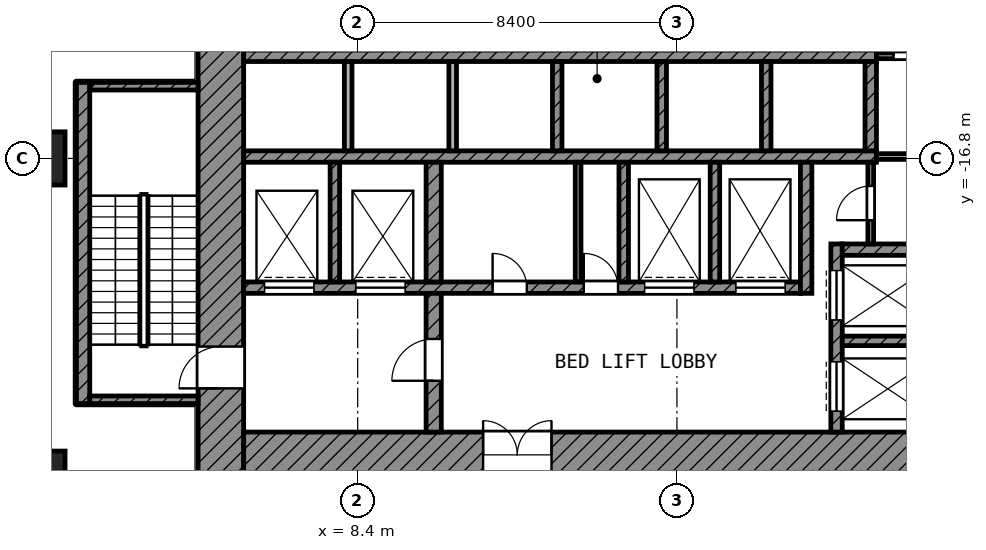
"""IFC4 building model, lengths in metres.
Left out: names, types, materials, properties, quantities, classifications, styles, units other than length and angle.
Written with IfcOpenShell. Run it as: python <this file> out.ifc"""

import sys

from ifc_helpers import new_model, si_unit, direction, frame, frame_2d, origin, origin_2d, place, context, subcontext, project, spatial, rectangle, extrude, element, fill, save


model = new_model("IFC4")
c1 = context("Model", 3, precision=1e-05, world=origin(), true_north=direction((0.0, 1.0)))
c2 = subcontext(c1, "Body", "Model", "MODEL_VIEW")
j1 = project(units=[si_unit("LENGTHUNIT", "METRE"), si_unit("PLANEANGLEUNIT", "RADIAN")], contexts=[c1])
p1 = place(None, origin())
s1 = spatial("IfcSite", under=j1, at=p1, CompositionType="ELEMENT")
p2 = place(p1, origin())
s2 = spatial("IfcBuilding", under=s1, at=p2, CompositionType="ELEMENT")
p3 = place(p2, frame((0.0, 0.0, 29.0)))
s3 = spatial("IfcBuildingStorey", under=s2, at=p3, CompositionType="ELEMENT", Elevation=29.0)
for number, where, z_axis, x_axis in (
    (1, (0.0, -16.8, 0.0), (0.0, 0.0, 1.0), (1.0, 0.0, 0.0)),
    (2, (0.0, -25.2, 0.0), (0.0, 0.0, 1.0), (1.0, 0.0, 0.0)),
):
    element("IfcColumn", number, at=place(p3, frame(where, z_axis=z_axis, x_axis=x_axis)), inside=s3, PredefinedType="COLUMN", context=c2, shape_type="SweptSolid", body=[
        extrude(rectangle(XDim=1.4, YDim=1.4, at=origin_2d()), origin(), (0.0, 0.0, 1.0), 5.2),
    ])
p4 = place(p3, frame((4.8, -25.2, 0.0), z_axis=(0.0, 0.0, 1.0), x_axis=(0.0, 1.0, 0.0)))
e3 = element("IfcWall", 3, at=p4, inside=s3, PredefinedType="SHEAR", context=c2, shape_type="SweptSolid", body=[
    extrude(rectangle(XDim=19.8, YDim=1.2, at=frame_2d((9.9, 0.0))), origin(), (0.0, 0.0, 1.0), 4.7),
])
p5 = place(p4, frame((11.65, 0.0, 0.0)))
e4 = element("IfcOpeningElement", 4, at=p5, cuts=e3, PredefinedType="OPENING", context=c2, shape_type="SweptSolid", body=[
    extrude(rectangle(XDim=1.1, YDim=2.1, at=frame_2d((0.55, 1.05))), frame((0.0, 0.61, 0.0), z_axis=(0.0, -1.0, 0.0), x_axis=(1.0, 0.0, 0.0)), (0.0, 0.0, 1.0), 1.22),
])
p6 = place(p4, frame((2.35, 0.0, 0.0)))
e5 = element("IfcOpeningElement", 5, at=p6, cuts=e3, PredefinedType="OPENING", context=c2, shape_type="SweptSolid", body=[
    extrude(rectangle(XDim=1.1, YDim=2.1, at=frame_2d((0.55, 1.05))), frame((0.0, 0.61, 0.0), z_axis=(0.0, -1.0, 0.0), x_axis=(1.0, 0.0, 0.0)), (0.0, 0.0, 1.0), 1.22),
])
p7 = place(p3, frame((5.4, -24.6, 0.0), z_axis=(0.0, 0.0, 1.0), x_axis=(1.0, 0.0, 0.0)))
e6 = element("IfcWall", 6, at=p7, inside=s3, PredefinedType="SHEAR", context=c2, shape_type="SweptSolid", body=[
    extrude(rectangle(XDim=18.6, YDim=1.2, at=frame_2d((9.3, 0.0))), origin(), (0.0, 0.0, 1.0), 4.7),
])
p8 = place(p7, frame((6.3, 0.0, 0.0)))
e7 = element("IfcOpeningElement", 7, at=p8, cuts=e6, PredefinedType="OPENING", context=c2, shape_type="SweptSolid", body=[
    extrude(rectangle(XDim=1.8, YDim=2.1, at=frame_2d((0.9, 1.05))), frame((0.0, 0.61, 0.0), z_axis=(0.0, -1.0, 0.0), x_axis=(1.0, 0.0, 0.0)), (0.0, 0.0, 1.0), 1.22),
])
for number, where, z_axis, x_axis in (
    (8, (5.4, -14.1, 0.0), (0.0, 0.0, 1.0), (1.0, 0.0, 0.0)),
    (9, (5.4, -16.75, 0.0), (0.0, 0.0, 1.0), (1.0, 0.0, 0.0)),
):
    element("IfcWall", number, at=place(p3, frame(where, z_axis=z_axis, x_axis=x_axis)), inside=s3, PredefinedType="SHEAR", context=c2, shape_type="SweptSolid", body=[
        extrude(rectangle(XDim=16.65, YDim=0.3, at=frame_2d((8.325, 0.0))), origin(), (0.0, 0.0, 1.0), 4.7),
    ])
p9 = place(p3, frame((5.4, -20.2, 0.0), z_axis=(0.0, 0.0, 1.0), x_axis=(1.0, 0.0, 0.0)))
e10 = element("IfcWall", 10, at=p9, inside=s3, PredefinedType="SHEAR", context=c2, shape_type="SweptSolid", body=[
    extrude(rectangle(XDim=14.65, YDim=0.3, at=frame_2d((7.325, 0.0))), origin(), (0.0, 0.0, 1.0), 4.7),
])
p10 = place(p9, frame((10.55, 0.0, 0.0)))
e11 = element("IfcOpeningElement", 11, at=p10, cuts=e10, PredefinedType="OPENING", context=c2, shape_type="SweptSolid", body=[
    extrude(rectangle(XDim=1.3, YDim=2.1, at=frame_2d((0.65, 1.05))), frame((0.0, 0.16, 0.0), z_axis=(0.0, -1.0, 0.0), x_axis=(1.0, 0.0, 0.0)), (0.0, 0.0, 1.0), 0.32),
])
p11 = place(p9, frame((12.95, 0.0, 0.0)))
e12 = element("IfcOpeningElement", 12, at=p11, cuts=e10, PredefinedType="OPENING", context=c2, shape_type="SweptSolid", body=[
    extrude(rectangle(XDim=1.3, YDim=2.1, at=frame_2d((0.65, 1.05))), frame((0.0, 0.16, 0.0), z_axis=(0.0, -1.0, 0.0), x_axis=(1.0, 0.0, 0.0)), (0.0, 0.0, 1.0), 0.32),
])
p12 = place(p9, frame((0.55, 0.0, 0.0)))
e13 = element("IfcOpeningElement", 13, at=p12, cuts=e10, PredefinedType="OPENING", context=c2, shape_type="SweptSolid", body=[
    extrude(rectangle(XDim=1.3, YDim=2.1, at=frame_2d((0.65, 1.05))), frame((0.0, 0.16, 0.0), z_axis=(0.0, -1.0, 0.0), x_axis=(1.0, 0.0, 0.0)), (0.0, 0.0, 1.0), 0.32),
])
p13 = place(p9, frame((2.95, 0.0, 0.0)))
e14 = element("IfcOpeningElement", 14, at=p13, cuts=e10, PredefinedType="OPENING", context=c2, shape_type="SweptSolid", body=[
    extrude(rectangle(XDim=1.3, YDim=2.1, at=frame_2d((0.65, 1.05))), frame((0.0, 0.16, 0.0), z_axis=(0.0, -1.0, 0.0), x_axis=(1.0, 0.0, 0.0)), (0.0, 0.0, 1.0), 0.32),
])
p14 = place(p9, frame((6.55, 0.0, 0.0)))
e15 = element("IfcOpeningElement", 15, at=p14, cuts=e10, PredefinedType="OPENING", context=c2, shape_type="SweptSolid", body=[
    extrude(rectangle(XDim=0.9, YDim=2.1, at=frame_2d((0.45, 1.05))), frame((0.0, 0.16, 0.0), z_axis=(0.0, -1.0, 0.0), x_axis=(1.0, 0.0, 0.0)), (0.0, 0.0, 1.0), 0.32),
])
p15 = place(p9, frame((8.95, 0.0, 0.0)))
e16 = element("IfcOpeningElement", 16, at=p15, cuts=e10, PredefinedType="OPENING", context=c2, shape_type="SweptSolid", body=[
    extrude(rectangle(XDim=0.9, YDim=2.1, at=frame_2d((0.45, 1.05))), frame((0.0, 0.16, 0.0), z_axis=(0.0, -1.0, 0.0), x_axis=(1.0, 0.0, 0.0)), (0.0, 0.0, 1.0), 0.32),
])
p16 = place(p3, frame((10.4, -24.0, 0.0), z_axis=(0.0, 0.0, 1.0), x_axis=(0.0, 1.0, 0.0)))
e17 = element("IfcWall", 17, at=p16, inside=s3, PredefinedType="SHEAR", context=c2, shape_type="SweptSolid", body=[
    extrude(rectangle(XDim=3.65, YDim=0.4, at=frame_2d((1.825, 0.0))), origin(), (0.0, 0.0, 1.0), 4.7),
])
p17 = place(p16, frame((1.35, 0.0, 0.0)))
e18 = element("IfcOpeningElement", 18, at=p17, cuts=e17, PredefinedType="OPENING", context=c2, shape_type="SweptSolid", body=[
    extrude(rectangle(XDim=1.1, YDim=2.1, at=frame_2d((0.55, 1.05))), frame((0.0, 0.21, 0.0), z_axis=(0.0, -1.0, 0.0), x_axis=(1.0, 0.0, 0.0)), (0.0, 0.0, 1.0), 0.42),
])
p18 = place(p3, frame((10.4, -20.05, 0.0), z_axis=(0.0, 0.0, 1.0), x_axis=(0.0, 1.0, 0.0)))
e19 = element("IfcWall", 19, at=p18, inside=s3, PredefinedType="SHEAR", context=c2, shape_type="SweptSolid", body=[
    extrude(rectangle(XDim=3.15, YDim=0.4, at=frame_2d((1.575, 0.0))), origin(), (0.0, 0.0, 1.0), 4.7),
])
p19 = place(p3, frame((20.2, -20.35, 0.0), z_axis=(0.0, 0.0, 1.0), x_axis=(0.0, 1.0, 0.0)))
e20 = element("IfcWall", 20, at=p19, inside=s3, PredefinedType="SHEAR", context=c2, shape_type="SweptSolid", body=[
    extrude(rectangle(XDim=3.45, YDim=0.3, at=frame_2d((1.725, 0.0))), origin(), (0.0, 0.0, 1.0), 4.7),
])
p20 = place(p3, frame((21.9, -16.6, 0.0), z_axis=(0.0, 0.0, 1.0), x_axis=(0.0, 1.0, 0.0)))
e21 = element("IfcWall", 21, at=p20, inside=s3, PredefinedType="SHEAR", context=c2, shape_type="SweptSolid", body=[
    extrude(rectangle(XDim=2.35, YDim=0.3, at=frame_2d((1.175, 0.0))), origin(), (0.0, 0.0, 1.0), 4.7),
])
p21 = place(p3, frame((21.15, -19.2, 0.0), z_axis=(0.0, 0.0, 1.0), x_axis=(1.0, 0.0, 0.0)))
e22 = element("IfcWall", 22, at=p21, inside=s3, PredefinedType="SHEAR", context=c2, shape_type="SweptSolid", body=[
    extrude(rectangle(XDim=2.85, YDim=0.3, at=frame_2d((1.425, 0.0))), origin(), (0.0, 0.0, 1.0), 4.7),
])
p22 = place(p3, frame((21.0, -24.0, 0.0), z_axis=(0.0, 0.0, 1.0), x_axis=(0.0, 1.0, 0.0)))
e23 = element("IfcWall", 23, at=p22, inside=s3, PredefinedType="SHEAR", context=c2, shape_type="SweptSolid", body=[
    extrude(rectangle(XDim=4.95, YDim=0.3, at=frame_2d((2.475, 0.0))), origin(), (0.0, 0.0, 1.0), 4.7),
])
p23 = place(p22, frame((2.95, 0.0, 0.0)))
e24 = element("IfcOpeningElement", 24, at=p23, cuts=e23, PredefinedType="OPENING", context=c2, shape_type="SweptSolid", body=[
    extrude(rectangle(XDim=1.3, YDim=2.1, at=frame_2d((0.65, 1.05))), frame((0.0, 0.16, 0.0), z_axis=(0.0, -1.0, 0.0), x_axis=(1.0, 0.0, 0.0)), (0.0, 0.0, 1.0), 0.32),
])
p24 = place(p22, frame((0.55, 0.0, 0.0)))
e25 = element("IfcOpeningElement", 25, at=p24, cuts=e23, PredefinedType="OPENING", context=c2, shape_type="SweptSolid", body=[
    extrude(rectangle(XDim=1.3, YDim=2.1, at=frame_2d((0.65, 1.05))), frame((0.0, 0.16, 0.0), z_axis=(0.0, -1.0, 0.0), x_axis=(1.0, 0.0, 0.0)), (0.0, 0.0, 1.0), 0.32),
])
p25 = place(p3, frame((21.15, -21.6, 0.0), z_axis=(0.0, 0.0, 1.0), x_axis=(1.0, 0.0, 0.0)))
e26 = element("IfcWall", 26, at=p25, inside=s3, PredefinedType="SHEAR", context=c2, shape_type="SweptSolid", body=[
    extrude(rectangle(XDim=2.85, YDim=0.25, at=frame_2d((1.425, 0.0))), origin(), (0.0, 0.0, 1.0), 4.7),
])
for number, where, z_axis, x_axis in (
    (27, (7.8, -20.05, 0.0), (0.0, 0.0, 1.0), (0.0, 1.0, 0.0)),
    (28, (15.4, -20.05, 0.0), (0.0, 0.0, 1.0), (0.0, 1.0, 0.0)),
    (29, (17.8, -20.05, 0.0), (0.0, 0.0, 1.0), (0.0, 1.0, 0.0)),
):
    element("IfcWall", number, at=place(p3, frame(where, z_axis=z_axis, x_axis=x_axis)), inside=s3, PredefinedType="SHEAR", context=c2, shape_type="SweptSolid", body=[
        extrude(rectangle(XDim=3.15, YDim=0.25, at=frame_2d((1.575, 0.0))), origin(), (0.0, 0.0, 1.0), 4.7),
    ])
for number, where, z_axis, x_axis in (
    (30, (8.15, -16.6, 0.0), (0.0, 0.0, 1.0), (0.0, 1.0, 0.0)),
    (31, (10.9, -16.6, 0.0), (0.0, 0.0, 1.0), (0.0, 1.0, 0.0)),
):
    element("IfcWall", number, at=place(p3, frame(where, z_axis=z_axis, x_axis=x_axis)), inside=s3, PredefinedType="PARTITIONING", context=c2, shape_type="SweptSolid", body=[
        extrude(rectangle(XDim=2.35, YDim=0.2, at=frame_2d((1.175, 0.0))), origin(), (0.0, 0.0, 1.0), 4.7),
    ])
for number, where, z_axis, x_axis in (
    (32, (13.65, -16.6, 0.0), (0.0, 0.0, 1.0), (0.0, 1.0, 0.0)),
    (33, (16.4, -16.6, 0.0), (0.0, 0.0, 1.0), (0.0, 1.0, 0.0)),
    (34, (19.15, -16.6, 0.0), (0.0, 0.0, 1.0), (0.0, 1.0, 0.0)),
):
    element("IfcWall", number, at=place(p3, frame(where, z_axis=z_axis, x_axis=x_axis)), inside=s3, PredefinedType="SHEAR", context=c2, shape_type="SweptSolid", body=[
        extrude(rectangle(XDim=2.35, YDim=0.25, at=frame_2d((1.175, 0.0))), origin(), (0.0, 0.0, 1.0), 4.7),
    ])
p26 = place(p3, frame((21.9, -19.05, 0.0), z_axis=(0.0, 0.0, 1.0), x_axis=(0.0, 1.0, 0.0)))
e35 = element("IfcWall", 35, at=p26, inside=s3, PredefinedType="PARTITIONING", context=c2, shape_type="SweptSolid", body=[
    extrude(rectangle(XDim=2.15, YDim=0.15, at=frame_2d((1.075, 0.0))), origin(), (0.0, 0.0, 1.0), 4.7),
])
p27 = place(p26, frame((0.625, 0.0, 0.0)))
e36 = element("IfcOpeningElement", 36, at=p27, cuts=e35, PredefinedType="OPENING", context=c2, shape_type="SweptSolid", body=[
    extrude(rectangle(XDim=0.9, YDim=2.1, at=frame_2d((0.45, 1.05))), frame((0.0, 0.085, 0.0), z_axis=(0.0, -1.0, 0.0), x_axis=(1.0, 0.0, 0.0)), (0.0, 0.0, 1.0), 0.17),
])
p28 = place(p3, frame((22.05, -16.75, 0.0), z_axis=(0.0, 0.0, 1.0), x_axis=(1.0, 0.0, 0.0)))
e37 = element("IfcWall", 37, at=p28, inside=s3, PredefinedType="PARTITIONING", context=c2, shape_type="SweptSolid", body=[
    extrude(rectangle(XDim=1.95, YDim=0.15, at=frame_2d((0.975, 0.0))), origin(), (0.0, 0.0, 1.0), 4.7),
])
p29 = place(p3, frame((22.05, -14.1, 0.0), z_axis=(0.0, 0.0, 1.0), x_axis=(1.0, 0.0, 0.0)))
e38 = element("IfcWall", 38, at=p29, inside=s3, PredefinedType="PARTITIONING", context=c2, shape_type="SweptSolid", body=[
    extrude(rectangle(XDim=1.95, YDim=0.15, at=frame_2d((0.975, 0.0))), origin(), (0.0, 0.0, 1.0), 4.7),
])
p30 = place(p29, frame((0.45, 0.0, 0.0)))
e39 = element("IfcOpeningElement", 39, at=p30, cuts=e38, PredefinedType="OPENING", context=c2, shape_type="SweptSolid", body=[
    extrude(rectangle(XDim=0.9, YDim=2.1, at=frame_2d((0.45, 1.05))), frame((0.0, 0.085, 0.0), z_axis=(0.0, -1.0, 0.0), x_axis=(1.0, 0.0, 0.0)), (0.0, 0.0, 1.0), 0.17),
])
p31 = place(p3, frame((14.2, -20.05, 0.0), z_axis=(0.0, 0.0, 1.0), x_axis=(0.0, 1.0, 0.0)))
e40 = element("IfcWall", 40, at=p31, inside=s3, PredefinedType="PARTITIONING", context=c2, shape_type="SweptSolid", body=[
    extrude(rectangle(XDim=3.15, YDim=0.15, at=frame_2d((1.575, 0.0))), origin(), (0.0, 0.0, 1.0), 4.7),
])
p32 = place(p3, frame((1.175, -23.25, 0.0), z_axis=(0.0, 0.0, 1.0), x_axis=(0.0, 1.0, 0.0)))
e41 = element("IfcWall", 41, at=p32, inside=s3, PredefinedType="SHEAR", context=c2, shape_type="SweptSolid", body=[
    extrude(rectangle(XDim=8.45, YDim=0.35, at=frame_2d((4.225, 0.0))), origin(), (0.0, 0.0, 1.0), 4.7),
])
for number, where, z_axis, x_axis in (
    (42, (1.35, -14.9, 0.0), (0.0, 0.0, 1.0), (1.0, 0.0, 0.0)),
    (43, (1.35, -23.15, 0.0), (0.0, 0.0, 1.0), (1.0, 0.0, 0.0)),
):
    element("IfcWall", number, at=place(p3, frame(where, z_axis=z_axis, x_axis=x_axis)), inside=s3, PredefinedType="SHEAR", context=c2, shape_type="SweptSolid", body=[
        extrude(rectangle(XDim=2.85, YDim=0.2, at=frame_2d((1.425, 0.0))), origin(), (0.0, 0.0, 1.0), 4.7),
    ])
p33 = place(p23, origin())
e44 = element("IfcDoor", 44, at=p33, inside=s3, OperationType="DOUBLE_DOOR_SLIDING", PredefinedType="DOOR", context=c2, shape_type="SweptSolid", body=[
    extrude(rectangle(XDim=1.3, YDim=2.1, at=frame_2d((0.65, 1.05))), frame((0.0, 0.025, 0.0), z_axis=(0.0, -1.0, 0.0), x_axis=(1.0, 0.0, 0.0)), (0.0, 0.0, 1.0), 0.05),
])
fill(e24, e44)
p34 = place(p24, origin())
e45 = element("IfcDoor", 45, at=p34, inside=s3, OperationType="DOUBLE_DOOR_SLIDING", PredefinedType="DOOR", context=c2, shape_type="SweptSolid", body=[
    extrude(rectangle(XDim=1.3, YDim=2.1, at=frame_2d((0.65, 1.05))), frame((0.0, 0.025, 0.0), z_axis=(0.0, -1.0, 0.0), x_axis=(1.0, 0.0, 0.0)), (0.0, 0.0, 1.0), 0.05),
])
fill(e25, e45)
p35 = place(p10, origin())
e46 = element("IfcDoor", 46, at=p35, inside=s3, OperationType="DOUBLE_DOOR_SLIDING", PredefinedType="DOOR", context=c2, shape_type="SweptSolid", body=[
    extrude(rectangle(XDim=1.3, YDim=2.1, at=frame_2d((0.65, 1.05))), frame((0.0, 0.025, 0.0), z_axis=(0.0, -1.0, 0.0), x_axis=(1.0, 0.0, 0.0)), (0.0, 0.0, 1.0), 0.05),
])
fill(e11, e46)
p36 = place(p11, origin())
e47 = element("IfcDoor", 47, at=p36, inside=s3, OperationType="DOUBLE_DOOR_SLIDING", PredefinedType="DOOR", context=c2, shape_type="SweptSolid", body=[
    extrude(rectangle(XDim=1.3, YDim=2.1, at=frame_2d((0.65, 1.05))), frame((0.0, 0.025, 0.0), z_axis=(0.0, -1.0, 0.0), x_axis=(1.0, 0.0, 0.0)), (0.0, 0.0, 1.0), 0.05),
])
fill(e12, e47)
p37 = place(p12, origin())
e48 = element("IfcDoor", 48, at=p37, inside=s3, OperationType="DOUBLE_DOOR_SLIDING", PredefinedType="DOOR", context=c2, shape_type="SweptSolid", body=[
    extrude(rectangle(XDim=1.3, YDim=2.1, at=frame_2d((0.65, 1.05))), frame((0.0, 0.025, 0.0), z_axis=(0.0, -1.0, 0.0), x_axis=(1.0, 0.0, 0.0)), (0.0, 0.0, 1.0), 0.05),
])
fill(e13, e48)
p38 = place(p13, origin())
e49 = element("IfcDoor", 49, at=p38, inside=s3, OperationType="DOUBLE_DOOR_SLIDING", PredefinedType="DOOR", context=c2, shape_type="SweptSolid", body=[
    extrude(rectangle(XDim=1.3, YDim=2.1, at=frame_2d((0.65, 1.05))), frame((0.0, 0.025, 0.0), z_axis=(0.0, -1.0, 0.0), x_axis=(1.0, 0.0, 0.0)), (0.0, 0.0, 1.0), 0.05),
])
fill(e14, e49)
p39 = place(p6, origin())
e50 = element("IfcDoor", 50, at=p39, inside=s3, OperationType="SINGLE_SWING_LEFT", PredefinedType="DOOR", context=c2, shape_type="SweptSolid", body=[
    extrude(rectangle(XDim=1.1, YDim=2.1, at=frame_2d((0.55, 1.05))), frame((0.0, 0.025, 0.0), z_axis=(0.0, -1.0, 0.0), x_axis=(1.0, 0.0, 0.0)), (0.0, 0.0, 1.0), 0.05),
])
fill(e5, e50)
p40 = place(p17, origin())
e51 = element("IfcDoor", 51, at=p40, inside=s3, OperationType="SINGLE_SWING_LEFT", PredefinedType="DOOR", context=c2, shape_type="SweptSolid", body=[
    extrude(rectangle(XDim=1.1, YDim=2.1, at=frame_2d((0.55, 1.05))), frame((0.0, 0.025, 0.0), z_axis=(0.0, -1.0, 0.0), x_axis=(1.0, 0.0, 0.0)), (0.0, 0.0, 1.0), 0.05),
])
fill(e18, e51)
p41 = place(p8, origin())
e52 = element("IfcDoor", 52, at=p41, inside=s3, OperationType="DOUBLE_DOOR_SINGLE_SWING", PredefinedType="DOOR", context=c2, shape_type="SweptSolid", body=[
    extrude(rectangle(XDim=1.8, YDim=2.1, at=frame_2d((0.9, 1.05))), frame((0.0, 0.025, 0.0), z_axis=(0.0, -1.0, 0.0), x_axis=(1.0, 0.0, 0.0)), (0.0, 0.0, 1.0), 0.05),
])
fill(e7, e52)
p42 = place(p30, origin())
e53 = element("IfcDoor", 53, at=p42, inside=s3, OperationType="SINGLE_SWING_LEFT", PredefinedType="DOOR", context=c2, shape_type="SweptSolid", body=[
    extrude(rectangle(XDim=0.9, YDim=2.1, at=frame_2d((0.45, 1.05))), frame((0.0, 0.025, 0.0), z_axis=(0.0, -1.0, 0.0), x_axis=(1.0, 0.0, 0.0)), (0.0, 0.0, 1.0), 0.05),
])
fill(e39, e53)
p43 = place(p27, origin())
e54 = element("IfcDoor", 54, at=p43, inside=s3, OperationType="SINGLE_SWING_LEFT", PredefinedType="DOOR", context=c2, shape_type="SweptSolid", body=[
    extrude(rectangle(XDim=0.9, YDim=2.1, at=frame_2d((0.45, 1.05))), frame((0.0, 0.025, 0.0), z_axis=(0.0, -1.0, 0.0), x_axis=(1.0, 0.0, 0.0)), (0.0, 0.0, 1.0), 0.05),
])
fill(e36, e54)
p44 = place(p14, origin())
e55 = element("IfcDoor", 55, at=p44, inside=s3, OperationType="SINGLE_SWING_LEFT", PredefinedType="DOOR", context=c2, shape_type="SweptSolid", body=[
    extrude(rectangle(XDim=0.9, YDim=2.1, at=frame_2d((0.45, 1.05))), frame((0.0, 0.025, 0.0), z_axis=(0.0, -1.0, 0.0), x_axis=(1.0, 0.0, 0.0)), (0.0, 0.0, 1.0), 0.05),
])
fill(e15, e55)
p45 = place(p15, origin())
e56 = element("IfcDoor", 56, at=p45, inside=s3, OperationType="SINGLE_SWING_LEFT", PredefinedType="DOOR", context=c2, shape_type="SweptSolid", body=[
    extrude(rectangle(XDim=0.9, YDim=2.1, at=frame_2d((0.45, 1.05))), frame((0.0, 0.025, 0.0), z_axis=(0.0, -1.0, 0.0), x_axis=(1.0, 0.0, 0.0)), (0.0, 0.0, 1.0), 0.05),
])
fill(e16, e56)
save(model, sys.argv[1])
